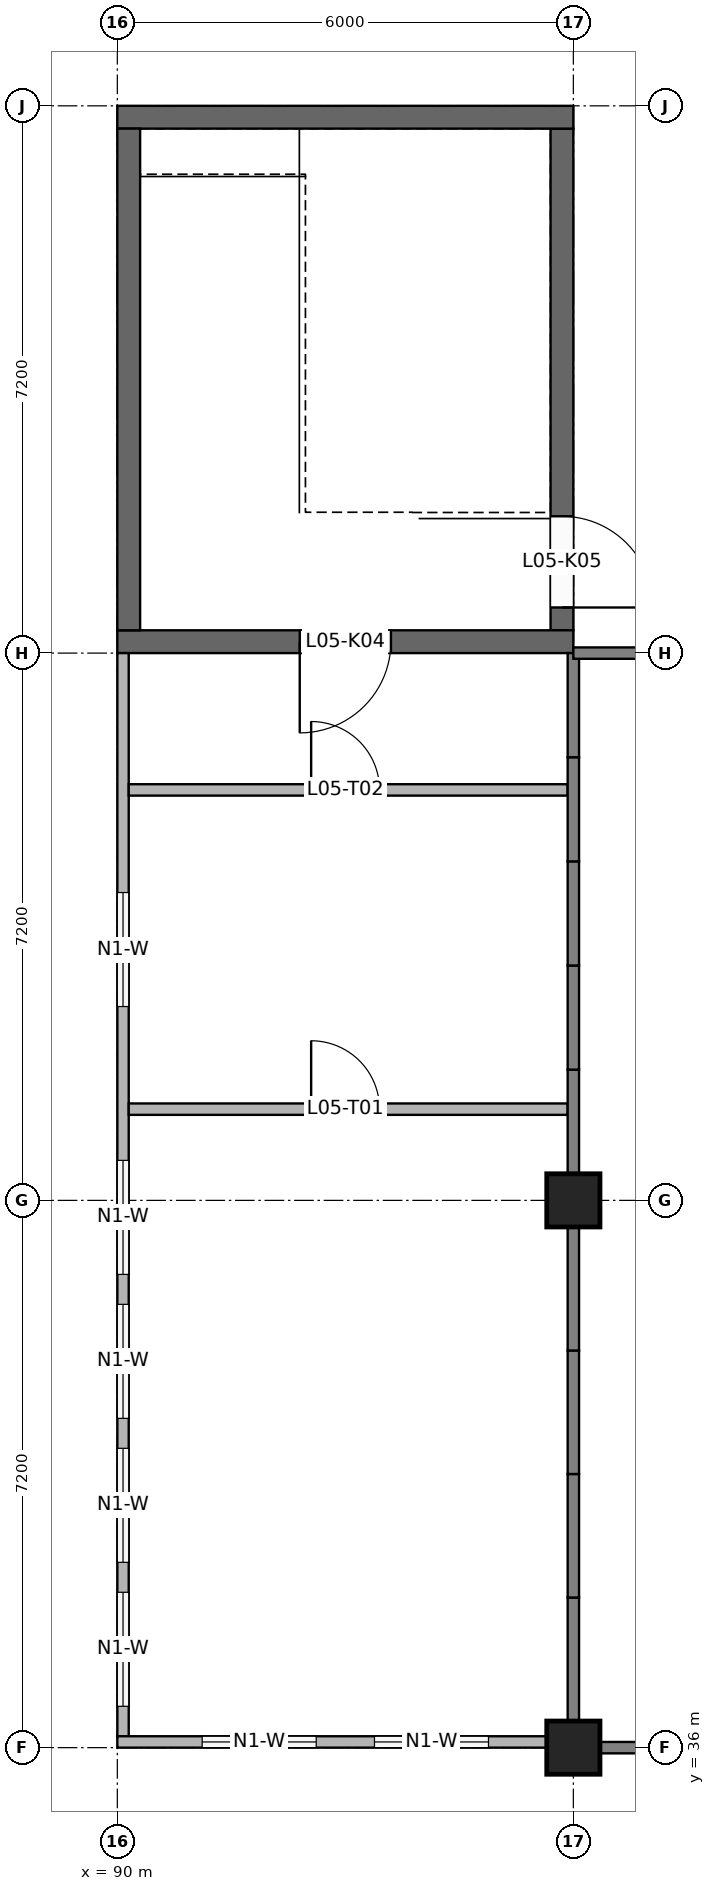
"""IFC4 building model, lengths in metres.
Left out: names, types, materials, properties, quantities, classifications, styles, units other than length and angle.
Written with IfcOpenShell. Run it as: python <this file> out.ifc"""

import sys

from ifc_helpers import new_model, si_unit, direction, frame, frame_2d, origin, origin_2d, place, context, subcontext, project, spatial, rectangle, extrude, element, fill, save


model = new_model("IFC4")
c1 = context("Model", 3, precision=1e-05, world=origin(), true_north=direction((0.0, 1.0)))
c2 = subcontext(c1, "Body", "Model", "MODEL_VIEW")
j1 = project(units=[si_unit("LENGTHUNIT", "METRE"), si_unit("PLANEANGLEUNIT", "RADIAN")], contexts=[c1])
p1 = place(None, origin())
s1 = spatial("IfcSite", under=j1, at=p1, CompositionType="ELEMENT")
p2 = place(p1, origin())
s2 = spatial("IfcBuilding", under=s1, at=p2, CompositionType="ELEMENT")
p3 = place(p2, frame((0.0, 0.0, 21.0)))
s3 = spatial("IfcBuildingStorey", under=s2, at=p3, CompositionType="ELEMENT", Elevation=21.0)
p4 = place(p3, frame((90.0, 50.55, 0.0), z_axis=(0.0, 0.0, 1.0), x_axis=(1.0, 0.0, 0.0)))
e1 = element("IfcWall", 1, at=p4, inside=s3, PredefinedType="SHEAR", context=c2, shape_type="SweptSolid", body=[
    extrude(rectangle(XDim=6.0, YDim=0.3, at=frame_2d((3.0, 0.0))), origin(), (0.0, 0.0, 1.0), 2.4),
])
p5 = place(p4, frame((2.4, 0.0, 0.0)))
e2 = element("IfcOpeningElement", 2, at=p5, cuts=e1, PredefinedType="OPENING", context=c2, shape_type="SweptSolid", body=[
    extrude(rectangle(XDim=1.2, YDim=2.1, at=frame_2d((0.6, 1.05))), frame((0.0, 0.16, 0.0), z_axis=(0.0, -1.0, 0.0), x_axis=(1.0, 0.0, 0.0)), (0.0, 0.0, 1.0), 0.32),
])
p6 = place(p3, frame((90.0, 57.45, 0.0), z_axis=(0.0, 0.0, 1.0), x_axis=(1.0, 0.0, 0.0)))
e3 = element("IfcWall", 3, at=p6, inside=s3, PredefinedType="SHEAR", context=c2, shape_type="SweptSolid", body=[
    extrude(rectangle(XDim=6.0, YDim=0.3, at=frame_2d((3.0, 0.0))), origin(), (0.0, 0.0, 1.0), 2.4),
])
p7 = place(p3, frame((90.15, 50.7, 0.0), z_axis=(0.0, 0.0, 1.0), x_axis=(0.0, 1.0, 0.0)))
e4 = element("IfcWall", 4, at=p7, inside=s3, PredefinedType="SHEAR", context=c2, shape_type="SweptSolid", body=[
    extrude(rectangle(XDim=6.6, YDim=0.3, at=frame_2d((3.3, 0.0))), origin(), (0.0, 0.0, 1.0), 2.4),
])
p8 = place(p3, frame((95.85, 50.7, 0.0), z_axis=(0.0, 0.0, 1.0), x_axis=(0.0, 1.0, 0.0)))
e5 = element("IfcWall", 5, at=p8, inside=s3, PredefinedType="SHEAR", context=c2, shape_type="SweptSolid", body=[
    extrude(rectangle(XDim=6.6, YDim=0.3, at=frame_2d((3.3, 0.0))), origin(), (0.0, 0.0, 1.0), 2.4),
])
p9 = place(p8, frame((0.3, 0.0, 0.0)))
e6 = element("IfcOpeningElement", 6, at=p9, cuts=e5, PredefinedType="OPENING", context=c2, shape_type="SweptSolid", body=[
    extrude(rectangle(XDim=1.2, YDim=2.1, at=frame_2d((0.6, 1.05))), frame((0.0, 0.16, 0.0), z_axis=(0.0, -1.0, 0.0), x_axis=(1.0, 0.0, 0.0)), (0.0, 0.0, 1.0), 0.32),
])
p10 = place(p3, frame((96.0, 36.0, 0.0), z_axis=(0.0, 0.0, 1.0), x_axis=(1.0, 0.0, 0.0)))
e7 = element("IfcColumn", 7, at=p10, inside=s3, PredefinedType="COLUMN", context=c2, shape_type="SweptSolid", body=[
    extrude(rectangle(XDim=0.7, YDim=0.7, at=origin_2d()), origin(), (0.0, 0.0, 1.0), 3.714),
])
p11 = place(p3, frame((96.0, 43.2, 0.0), z_axis=(0.0, 0.0, 1.0), x_axis=(1.0, 0.0, 0.0)))
e8 = element("IfcColumn", 8, at=p11, inside=s3, PredefinedType="COLUMN", context=c2, shape_type="SweptSolid", body=[
    extrude(rectangle(XDim=0.7, YDim=0.7, at=origin_2d()), origin(), (0.0, 0.0, 1.0), 2.247),
])
p12 = place(p3, frame((96.0, 57.51, 0.0), z_axis=(0.0, 0.0, 1.0), x_axis=(1.0, 0.0, 0.0)))
e9 = element("IfcWall", 9, at=p12, inside=s3, PredefinedType="PARAPET", context=c2, shape_type="SweptSolid", body=[
    extrude(rectangle(XDim=12.0, YDim=0.18, at=frame_2d((6.0, 0.0))), origin(), (0.0, 0.0, 1.0), 1.1),
])
p13 = place(p3, frame((90.075, 36.0, 0.0), z_axis=(0.0, 0.0, 1.0), x_axis=(0.0, 1.0, 0.0)))
e10 = element("IfcWall", 10, at=p13, inside=s3, PredefinedType="PARAPET", context=c2, shape_type="SweptSolid", body=[
    extrude(rectangle(XDim=14.4, YDim=0.15, at=frame_2d((7.2, 0.0))), origin(), (0.0, 0.0, 1.0), 1.1),
])
p14 = place(p3, frame((90.0, 36.075, 0.0), z_axis=(0.0, 0.0, 1.0), x_axis=(1.0, 0.0, 0.0)))
e11 = element("IfcWall", 11, at=p14, inside=s3, PredefinedType="PARAPET", context=c2, shape_type="SweptSolid", body=[
    extrude(rectangle(XDim=6.0, YDim=0.15, at=frame_2d((3.0, 0.0))), origin(), (0.0, 0.0, 1.0), 1.1),
])
p15 = place(p3, frame((90.075, 36.15, 1.1), z_axis=(0.0, 0.0, 1.0), x_axis=(0.0, 1.0, 0.0)))
e12 = element("IfcWall", 12, at=p15, inside=s3, PredefinedType="SOLIDWALL", context=c2, shape_type="SweptSolid", body=[
    extrude(rectangle(XDim=14.25, YDim=0.15, at=frame_2d((7.125, 0.0))), origin(), (0.0, 0.0, 1.0), 1.65),
])
p16 = place(p15, frame((0.394, 0.0, 0.3)))
e13 = element("IfcOpeningElement", 13, at=p16, cuts=e12, PredefinedType="OPENING", context=c2, shape_type="SweptSolid", body=[
    extrude(rectangle(XDim=1.5, YDim=1.0, at=frame_2d((0.75, 0.5))), frame((0.0, 0.085, 0.0), z_axis=(0.0, -1.0, 0.0), x_axis=(1.0, 0.0, 0.0)), (0.0, 0.0, 1.0), 0.17),
])
p17 = place(p15, frame((2.288, 0.0, 0.3)))
e14 = element("IfcOpeningElement", 14, at=p17, cuts=e12, PredefinedType="OPENING", context=c2, shape_type="SweptSolid", body=[
    extrude(rectangle(XDim=1.5, YDim=1.0, at=frame_2d((0.75, 0.5))), frame((0.0, 0.085, 0.0), z_axis=(0.0, -1.0, 0.0), x_axis=(1.0, 0.0, 0.0)), (0.0, 0.0, 1.0), 0.17),
])
p18 = place(p15, frame((4.182, 0.0, 0.3)))
e15 = element("IfcOpeningElement", 15, at=p18, cuts=e12, PredefinedType="OPENING", context=c2, shape_type="SweptSolid", body=[
    extrude(rectangle(XDim=1.5, YDim=1.0, at=frame_2d((0.75, 0.5))), frame((0.0, 0.085, 0.0), z_axis=(0.0, -1.0, 0.0), x_axis=(1.0, 0.0, 0.0)), (0.0, 0.0, 1.0), 0.17),
])
p19 = place(p15, frame((6.076, 0.0, 0.3)))
e16 = element("IfcOpeningElement", 16, at=p19, cuts=e12, PredefinedType="OPENING", context=c2, shape_type="SweptSolid", body=[
    extrude(rectangle(XDim=1.5, YDim=1.0, at=frame_2d((0.75, 0.5))), frame((0.0, 0.085, 0.0), z_axis=(0.0, -1.0, 0.0), x_axis=(1.0, 0.0, 0.0)), (0.0, 0.0, 1.0), 0.17),
])
p20 = place(p15, frame((9.6, 0.0, 0.3)))
e17 = element("IfcOpeningElement", 17, at=p20, cuts=e12, PredefinedType="OPENING", context=c2, shape_type="SweptSolid", body=[
    extrude(rectangle(XDim=1.5, YDim=1.0, at=frame_2d((0.75, 0.5))), frame((0.0, 0.085, 0.0), z_axis=(0.0, -1.0, 0.0), x_axis=(1.0, 0.0, 0.0)), (0.0, 0.0, 1.0), 0.17),
])
p21 = place(p3, frame((90.0, 36.075, 1.1), z_axis=(0.0, 0.0, 1.0), x_axis=(1.0, 0.0, 0.0)))
e18 = element("IfcWall", 18, at=p21, inside=s3, PredefinedType="SOLIDWALL", context=c2, shape_type="SweptSolid", body=[
    extrude(rectangle(XDim=5.65, YDim=0.15, at=frame_2d((2.825, 0.0))), origin(), (0.0, 0.0, 1.0), 1.65),
])
p22 = place(p21, frame((1.117, 0.0, 0.3)))
e19 = element("IfcOpeningElement", 19, at=p22, cuts=e18, PredefinedType="OPENING", context=c2, shape_type="SweptSolid", body=[
    extrude(rectangle(XDim=1.5, YDim=1.0, at=frame_2d((0.75, 0.5))), frame((0.0, 0.085, 0.0), z_axis=(0.0, -1.0, 0.0), x_axis=(1.0, 0.0, 0.0)), (0.0, 0.0, 1.0), 0.17),
])
p23 = place(p21, frame((3.383, 0.0, 0.3)))
e20 = element("IfcOpeningElement", 20, at=p23, cuts=e18, PredefinedType="OPENING", context=c2, shape_type="SweptSolid", body=[
    extrude(rectangle(XDim=1.5, YDim=1.0, at=frame_2d((0.75, 0.5))), frame((0.0, 0.085, 0.0), z_axis=(0.0, -1.0, 0.0), x_axis=(1.0, 0.0, 0.0)), (0.0, 0.0, 1.0), 0.17),
])
p24 = place(p3, frame((90.15, 44.4, 0.0), z_axis=(0.0, 0.0, 1.0), x_axis=(1.0, 0.0, 0.0)))
e21 = element("IfcWall", 21, at=p24, inside=s3, PredefinedType="PARTITIONING", context=c2, shape_type="SweptSolid", body=[
    extrude(rectangle(XDim=5.775, YDim=0.15, at=frame_2d((2.888, 0.0))), origin(), (0.0, 0.0, 1.0), 2.75),
])
p25 = place(p24, frame((2.4, 0.0, 0.0)))
e22 = element("IfcOpeningElement", 22, at=p25, cuts=e21, PredefinedType="OPENING", context=c2, shape_type="SweptSolid", body=[
    extrude(rectangle(XDim=0.9, YDim=2.1, at=frame_2d((0.45, 1.05))), frame((0.0, 0.085, 0.0), z_axis=(0.0, -1.0, 0.0), x_axis=(1.0, 0.0, 0.0)), (0.0, 0.0, 1.0), 0.17),
])
p26 = place(p3, frame((90.15, 48.6, 0.0), z_axis=(0.0, 0.0, 1.0), x_axis=(1.0, 0.0, 0.0)))
e23 = element("IfcWall", 23, at=p26, inside=s3, PredefinedType="PARTITIONING", context=c2, shape_type="SweptSolid", body=[
    extrude(rectangle(XDim=5.775, YDim=0.15, at=frame_2d((2.888, 0.0))), origin(), (0.0, 0.0, 1.0), 2.75),
])
p27 = place(p26, frame((2.4, 0.0, 0.0)))
e24 = element("IfcOpeningElement", 24, at=p27, cuts=e23, PredefinedType="OPENING", context=c2, shape_type="SweptSolid", body=[
    extrude(rectangle(XDim=0.9, YDim=2.1, at=frame_2d((0.45, 1.05))), frame((0.0, 0.085, 0.0), z_axis=(0.0, -1.0, 0.0), x_axis=(1.0, 0.0, 0.0)), (0.0, 0.0, 1.0), 0.17),
])
p28 = place(p16, origin())
e25 = element("IfcWindow", 25, at=p28, inside=s3, PartitioningType="SINGLE_PANEL", PredefinedType="WINDOW", context=c2, shape_type="SweptSolid", body=[
    extrude(rectangle(XDim=1.5, YDim=1.0, at=frame_2d((0.75, 0.5))), frame((0.0, 0.03, 0.0), z_axis=(0.0, -1.0, 0.0), x_axis=(1.0, 0.0, 0.0)), (0.0, 0.0, 1.0), 0.06),
])
fill(e13, e25)
p29 = place(p17, origin())
e26 = element("IfcWindow", 26, at=p29, inside=s3, PartitioningType="SINGLE_PANEL", PredefinedType="WINDOW", context=c2, shape_type="SweptSolid", body=[
    extrude(rectangle(XDim=1.5, YDim=1.0, at=frame_2d((0.75, 0.5))), frame((0.0, 0.03, 0.0), z_axis=(0.0, -1.0, 0.0), x_axis=(1.0, 0.0, 0.0)), (0.0, 0.0, 1.0), 0.06),
])
fill(e14, e26)
p30 = place(p18, origin())
e27 = element("IfcWindow", 27, at=p30, inside=s3, PartitioningType="SINGLE_PANEL", PredefinedType="WINDOW", context=c2, shape_type="SweptSolid", body=[
    extrude(rectangle(XDim=1.5, YDim=1.0, at=frame_2d((0.75, 0.5))), frame((0.0, 0.03, 0.0), z_axis=(0.0, -1.0, 0.0), x_axis=(1.0, 0.0, 0.0)), (0.0, 0.0, 1.0), 0.06),
])
fill(e15, e27)
p31 = place(p19, origin())
e28 = element("IfcWindow", 28, at=p31, inside=s3, PartitioningType="SINGLE_PANEL", PredefinedType="WINDOW", context=c2, shape_type="SweptSolid", body=[
    extrude(rectangle(XDim=1.5, YDim=1.0, at=frame_2d((0.75, 0.5))), frame((0.0, 0.03, 0.0), z_axis=(0.0, -1.0, 0.0), x_axis=(1.0, 0.0, 0.0)), (0.0, 0.0, 1.0), 0.06),
])
fill(e16, e28)
p32 = place(p20, origin())
e29 = element("IfcWindow", 29, at=p32, inside=s3, PartitioningType="SINGLE_PANEL", PredefinedType="WINDOW", context=c2, shape_type="SweptSolid", body=[
    extrude(rectangle(XDim=1.5, YDim=1.0, at=frame_2d((0.75, 0.5))), frame((0.0, 0.03, 0.0), z_axis=(0.0, -1.0, 0.0), x_axis=(1.0, 0.0, 0.0)), (0.0, 0.0, 1.0), 0.06),
])
fill(e17, e29)
p33 = place(p22, origin())
e30 = element("IfcWindow", 30, at=p33, inside=s3, PartitioningType="SINGLE_PANEL", PredefinedType="WINDOW", context=c2, shape_type="SweptSolid", body=[
    extrude(rectangle(XDim=1.5, YDim=1.0, at=frame_2d((0.75, 0.5))), frame((0.0, 0.03, 0.0), z_axis=(0.0, -1.0, 0.0), x_axis=(1.0, 0.0, 0.0)), (0.0, 0.0, 1.0), 0.06),
])
fill(e19, e30)
p34 = place(p23, origin())
e31 = element("IfcWindow", 31, at=p34, inside=s3, PartitioningType="SINGLE_PANEL", PredefinedType="WINDOW", context=c2, shape_type="SweptSolid", body=[
    extrude(rectangle(XDim=1.5, YDim=1.0, at=frame_2d((0.75, 0.5))), frame((0.0, 0.03, 0.0), z_axis=(0.0, -1.0, 0.0), x_axis=(1.0, 0.0, 0.0)), (0.0, 0.0, 1.0), 0.06),
])
fill(e20, e31)
p35 = place(p5, frame((1.2, 0.0, 0.0), z_axis=(0.0, 0.0, 1.0), x_axis=(-1.0, 0.0, 0.0)))
e32 = element("IfcDoor", 32, at=p35, inside=s3, OperationType="SINGLE_SWING_RIGHT", PredefinedType="DOOR", context=c2, shape_type="SweptSolid", body=[
    extrude(rectangle(XDim=1.2, YDim=2.1, at=frame_2d((0.6, 1.05))), frame((0.0, 0.025, 0.0), z_axis=(0.0, -1.0, 0.0), x_axis=(1.0, 0.0, 0.0)), (0.0, 0.0, 1.0), 0.05),
])
fill(e2, e32)
p36 = place(p9, frame((1.2, 0.0, 0.0), z_axis=(0.0, 0.0, 1.0), x_axis=(-1.0, 0.0, 0.0)))
e33 = element("IfcDoor", 33, at=p36, inside=s3, OperationType="SINGLE_SWING_RIGHT", PredefinedType="DOOR", context=c2, shape_type="SweptSolid", body=[
    extrude(rectangle(XDim=1.2, YDim=2.1, at=frame_2d((0.6, 1.05))), frame((0.0, 0.025, 0.0), z_axis=(0.0, -1.0, 0.0), x_axis=(1.0, 0.0, 0.0)), (0.0, 0.0, 1.0), 0.05),
])
fill(e6, e33)
p37 = place(p25, origin())
e34 = element("IfcDoor", 34, at=p37, inside=s3, OperationType="SINGLE_SWING_LEFT", PredefinedType="DOOR", context=c2, shape_type="SweptSolid", body=[
    extrude(rectangle(XDim=0.9, YDim=2.1, at=frame_2d((0.45, 1.05))), frame((0.0, 0.025, 0.0), z_axis=(0.0, -1.0, 0.0), x_axis=(1.0, 0.0, 0.0)), (0.0, 0.0, 1.0), 0.05),
])
fill(e22, e34)
p38 = place(p27, origin())
e35 = element("IfcDoor", 35, at=p38, inside=s3, OperationType="SINGLE_SWING_LEFT", PredefinedType="DOOR", context=c2, shape_type="SweptSolid", body=[
    extrude(rectangle(XDim=0.9, YDim=2.1, at=frame_2d((0.45, 1.05))), frame((0.0, 0.025, 0.0), z_axis=(0.0, -1.0, 0.0), x_axis=(1.0, 0.0, 0.0)), (0.0, 0.0, 1.0), 0.05),
])
fill(e24, e35)
save(model, sys.argv[1])
